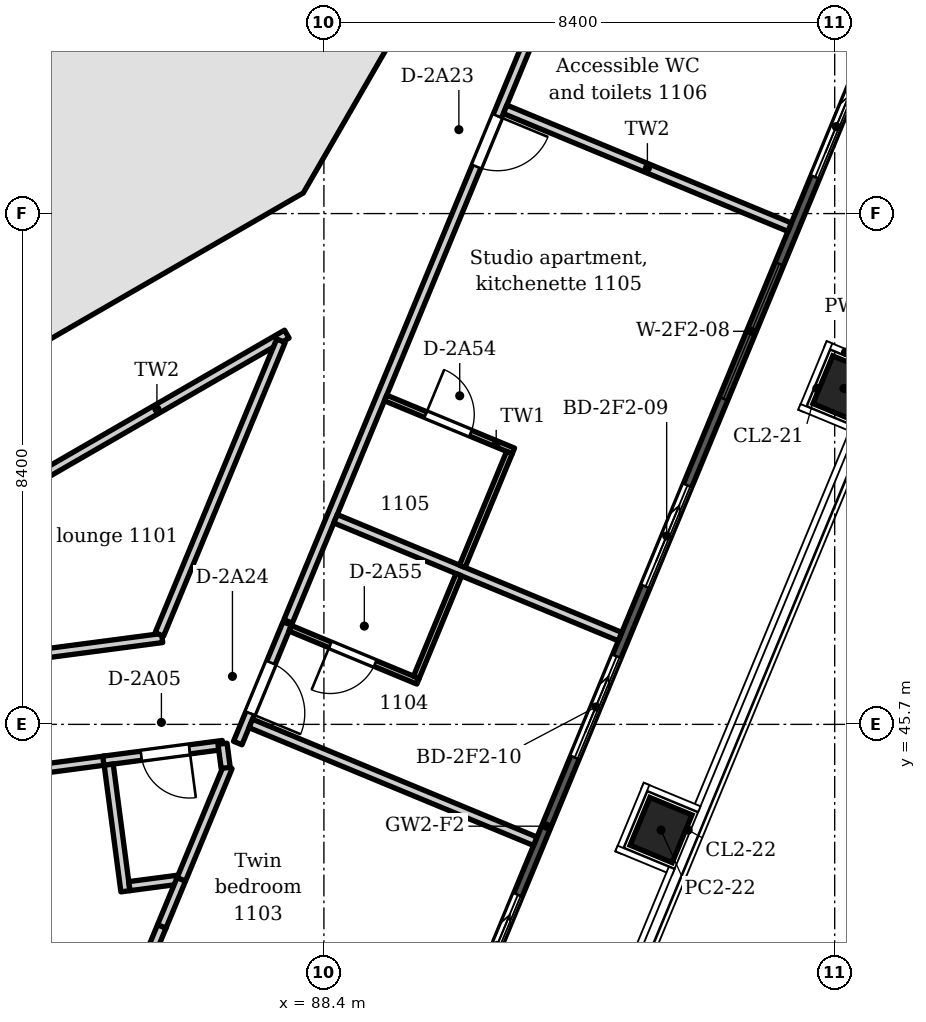
"""IFC4 building model, lengths in metres.
Left out: names, types, materials, properties, quantities, classifications, styles, units other than length and angle.
Written with IfcOpenShell. Run it as: python <this file> out.ifc"""

import sys

from ifc_helpers import new_model, si_unit, direction, frame, frame_2d, origin, origin_2d, place, context, subcontext, project, spatial, polyline, rectangle, outline, extrude, element, fill, save


model = new_model("IFC4")
c1 = context("Model", 3, precision=1e-05, world=origin(), true_north=direction((0.0, 1.0)))
c2 = subcontext(c1, "Body", "Model", "MODEL_VIEW")
j1 = project(units=[si_unit("LENGTHUNIT", "METRE"), si_unit("PLANEANGLEUNIT", "RADIAN")], contexts=[c1])
p1 = place(None, origin())
s1 = spatial("IfcSite", under=j1, at=p1, CompositionType="ELEMENT")
p2 = place(p1, origin())
s2 = spatial("IfcBuilding", under=s1, at=p2, CompositionType="ELEMENT")
p3 = place(p2, frame((0.0, 0.0, 50.4)))
s3 = spatial("IfcBuildingStorey", under=s2, at=p3, CompositionType="ELEMENT", Elevation=50.4)
p4 = place(p3, frame((82.65, 52.008, 0.0), z_axis=(0.0, 0.0, 1.0), x_axis=(0.866037463336, 0.499979111662, 0.0)))
e1 = element("IfcWall", 1, at=p4, inside=s3, PredefinedType="SHEAR", context=c2, shape_type="SweptSolid", body=[
    extrude(outline(polyline([(0.0, -0.6), (5.901, -0.6), (5.58, 0.6), (0.322, 0.6), (0.0, -0.6)])), origin(), (0.0, 0.0, 1.0), 3.6),
])
p5 = place(p4, frame((3.85, 0.0, 0.0)))
e2 = element("IfcOpeningElement", 2, at=p5, cuts=e1, PredefinedType="OPENING", context=c2, shape_type="SweptSolid", body=[
    extrude(rectangle(XDim=0.9, YDim=2.1, at=frame_2d((0.45, 1.05))), frame((0.0, 0.61, 0.0), z_axis=(0.0, -1.0, 0.0), x_axis=(1.0, 0.0, 0.0)), (0.0, 0.0, 1.0), 1.22),
])
p6 = place(p3, frame((87.542, 54.739, 0.0), z_axis=(0.0, 0.0, 1.0), x_axis=(0.499979111662, 0.866037463336, 0.0)))
e3 = element("IfcWall", 3, at=p6, inside=s3, PredefinedType="SHEAR", context=c2, shape_type="SweptSolid", body=[
    extrude(outline(polyline([(0.0, -0.6), (5.901, -0.6), (5.58, 0.6), (0.322, 0.6), (0.0, -0.6)])), origin(), (0.0, 0.0, 1.0), 3.6),
])
p7 = place(p6, frame((2.25, 0.0, 0.0)))
e4 = element("IfcOpeningElement", 4, at=p7, cuts=e3, PredefinedType="OPENING", context=c2, shape_type="SweptSolid", body=[
    extrude(rectangle(XDim=1.4, YDim=2.1, at=frame_2d((0.7, 1.05))), frame((0.0, 0.61, 0.0), z_axis=(0.0, -1.0, 0.0), x_axis=(1.0, 0.0, 0.0)), (0.0, 0.0, 1.0), 1.22),
])
p8 = place(p3, frame((80.225, 60.552, 0.0), z_axis=(0.0, 0.0, 1.0), x_axis=(0.865965399159, -0.500103916661, 0.0)))
e5 = element("IfcWall", 5, at=p8, inside=s3, PredefinedType="SHEAR", context=c2, shape_type="SweptSolid", body=[
    extrude(rectangle(XDim=8.642, YDim=0.3, at=frame_2d((4.321, 0.0))), origin(), (0.0, 0.0, 1.0), 3.6),
])
for number, where, z_axis, x_axis in (
    (6, (96.952, 51.224, -0.35), (0.0, 0.0, 1.0), (0.383, 0.924, 0.0)),
    (7, (93.944, 43.962, -0.35), (0.0, 0.0, 1.0), (0.383, 0.924, 0.0)),
):
    element("IfcColumn", number, at=place(p3, frame(where, z_axis=z_axis, x_axis=x_axis)), inside=s3, PredefinedType="COLUMN", context=c2, shape_type="SweptSolid", body=[
        extrude(rectangle(XDim=0.85, YDim=0.75, at=origin_2d()), origin(), (0.0, 0.0, 1.0), 3.95),
    ])
p9 = place(p3, frame((105.889, 77.411, 0.0), z_axis=(0.0, 0.0, 1.0), x_axis=(-0.38268395344, -0.923879316675, 0.0)))
e8 = element("IfcWall", 8, at=p9, inside=s3, PredefinedType="SOLIDWALL", context=c2, shape_type="SweptSolid", body=[
    extrude(outline(polyline([(0.149, 0.075), (0.149, -0.075), (47.217, -0.075), (47.217, 0.075), (0.149, 0.075)])), origin(), (0.0, 0.0, 1.0), 3.3),
])
p10 = place(p9, frame((1.222, 0.0, 0.0)))
e9 = element("IfcOpeningElement", 9, at=p10, cuts=e8, PredefinedType="OPENING", context=c2, shape_type="SweptSolid", body=[
    extrude(rectangle(XDim=1.8, YDim=2.6, at=frame_2d((0.9, 1.3))), frame((0.0, 0.085, 0.0), z_axis=(0.0, -1.0, 0.0), x_axis=(1.0, 0.0, 0.0)), (0.0, 0.0, 1.0), 0.17),
])
p11 = place(p9, frame((4.565, 0.0, 0.0)))
e10 = element("IfcOpeningElement", 10, at=p11, cuts=e8, PredefinedType="OPENING", context=c2, shape_type="SweptSolid", body=[
    extrude(rectangle(XDim=1.8, YDim=2.6, at=frame_2d((0.9, 1.3))), frame((0.0, 0.085, 0.0), z_axis=(0.0, -1.0, 0.0), x_axis=(1.0, 0.0, 0.0)), (0.0, 0.0, 1.0), 0.17),
])
p12 = place(p9, frame((8.209, 0.0, 0.0)))
e11 = element("IfcOpeningElement", 11, at=p12, cuts=e8, PredefinedType="OPENING", context=c2, shape_type="SweptSolid", body=[
    extrude(rectangle(XDim=1.8, YDim=2.6, at=frame_2d((0.9, 1.3))), frame((0.0, 0.085, 0.0), z_axis=(0.0, -1.0, 0.0), x_axis=(1.0, 0.0, 0.0)), (0.0, 0.0, 1.0), 0.17),
])
p13 = place(p9, frame((12.453, 0.0, 0.0)))
e12 = element("IfcOpeningElement", 12, at=p13, cuts=e8, PredefinedType="OPENING", context=c2, shape_type="SweptSolid", body=[
    extrude(rectangle(XDim=1.8, YDim=2.6, at=frame_2d((0.9, 1.3))), frame((0.0, 0.085, 0.0), z_axis=(0.0, -1.0, 0.0), x_axis=(1.0, 0.0, 0.0)), (0.0, 0.0, 1.0), 0.17),
])
p14 = place(p9, frame((15.496, 0.0, 0.0)))
e13 = element("IfcOpeningElement", 13, at=p14, cuts=e8, PredefinedType="OPENING", context=c2, shape_type="SweptSolid", body=[
    extrude(rectangle(XDim=1.8, YDim=2.6, at=frame_2d((0.9, 1.3))), frame((0.0, 0.085, 0.0), z_axis=(0.0, -1.0, 0.0), x_axis=(1.0, 0.0, 0.0)), (0.0, 0.0, 1.0), 0.17),
])
p15 = place(p9, frame((18.84, 0.0, 0.15)))
e14 = element("IfcOpeningElement", 14, at=p15, cuts=e8, PredefinedType="OPENING", context=c2, shape_type="SweptSolid", body=[
    extrude(rectangle(XDim=2.4, YDim=2.45, at=frame_2d((1.2, 1.225))), frame((0.0, 0.085, 0.0), z_axis=(0.0, -1.0, 0.0), x_axis=(1.0, 0.0, 0.0)), (0.0, 0.0, 1.0), 0.17),
])
p16 = place(p9, frame((22.783, 0.0, 0.0)))
e15 = element("IfcOpeningElement", 15, at=p16, cuts=e8, PredefinedType="OPENING", context=c2, shape_type="SweptSolid", body=[
    extrude(rectangle(XDim=1.8, YDim=2.6, at=frame_2d((0.9, 1.3))), frame((0.0, 0.085, 0.0), z_axis=(0.0, -1.0, 0.0), x_axis=(1.0, 0.0, 0.0)), (0.0, 0.0, 1.0), 0.17),
])
p17 = place(p9, frame((26.127, 0.0, 0.15)))
e16 = element("IfcOpeningElement", 16, at=p17, cuts=e8, PredefinedType="OPENING", context=c2, shape_type="SweptSolid", body=[
    extrude(rectangle(XDim=2.4, YDim=2.45, at=frame_2d((1.2, 1.225))), frame((0.0, 0.085, 0.0), z_axis=(0.0, -1.0, 0.0), x_axis=(1.0, 0.0, 0.0)), (0.0, 0.0, 1.0), 0.17),
])
p18 = place(p9, frame((30.071, 0.0, 0.0)))
e17 = element("IfcOpeningElement", 17, at=p18, cuts=e8, PredefinedType="OPENING", context=c2, shape_type="SweptSolid", body=[
    extrude(rectangle(XDim=1.8, YDim=2.6, at=frame_2d((0.9, 1.3))), frame((0.0, 0.085, 0.0), z_axis=(0.0, -1.0, 0.0), x_axis=(1.0, 0.0, 0.0)), (0.0, 0.0, 1.0), 0.17),
])
p19 = place(p9, frame((33.114, 0.0, 0.0)))
e18 = element("IfcOpeningElement", 18, at=p19, cuts=e8, PredefinedType="OPENING", context=c2, shape_type="SweptSolid", body=[
    extrude(rectangle(XDim=1.8, YDim=2.6, at=frame_2d((0.9, 1.3))), frame((0.0, 0.085, 0.0), z_axis=(0.0, -1.0, 0.0), x_axis=(1.0, 0.0, 0.0)), (0.0, 0.0, 1.0), 0.17),
])
p20 = place(p9, frame((37.358, 0.0, 0.0)))
e19 = element("IfcOpeningElement", 19, at=p20, cuts=e8, PredefinedType="OPENING", context=c2, shape_type="SweptSolid", body=[
    extrude(rectangle(XDim=1.8, YDim=2.6, at=frame_2d((0.9, 1.3))), frame((0.0, 0.085, 0.0), z_axis=(0.0, -1.0, 0.0), x_axis=(1.0, 0.0, 0.0)), (0.0, 0.0, 1.0), 0.17),
])
p21 = place(p9, frame((41.001, 0.0, 0.0)))
e20 = element("IfcOpeningElement", 20, at=p21, cuts=e8, PredefinedType="OPENING", context=c2, shape_type="SweptSolid", body=[
    extrude(rectangle(XDim=1.8, YDim=2.6, at=frame_2d((0.9, 1.3))), frame((0.0, 0.085, 0.0), z_axis=(0.0, -1.0, 0.0), x_axis=(1.0, 0.0, 0.0)), (0.0, 0.0, 1.0), 0.17),
])
p22 = place(p9, frame((44.345, 0.0, 0.0)))
e21 = element("IfcOpeningElement", 21, at=p22, cuts=e8, PredefinedType="OPENING", context=c2, shape_type="SweptSolid", body=[
    extrude(rectangle(XDim=1.8, YDim=2.6, at=frame_2d((0.9, 1.3))), frame((0.0, 0.085, 0.0), z_axis=(0.0, -1.0, 0.0), x_axis=(1.0, 0.0, 0.0)), (0.0, 0.0, 1.0), 0.17),
])
p23 = place(p3, frame((78.586, 46.178, 0.0), z_axis=(0.0, 0.0, 1.0), x_axis=(0.991437356371, 0.130583185714, 0.0)))
e22 = element("IfcWall", 22, at=p23, inside=s3, PredefinedType="PARTITIONING", context=c2, shape_type="SweptSolid", body=[
    extrude(rectangle(XDim=7.215, YDim=0.15, at=frame_2d((3.607, 0.0))), origin(), (0.0, 0.0, 1.0), 2.75),
])
p24 = place(p23, frame((3.12, 0.0, 0.0)))
e23 = element("IfcOpeningElement", 23, at=p24, cuts=e22, PredefinedType="OPENING", context=c2, shape_type="SweptSolid", body=[
    extrude(rectangle(XDim=0.9, YDim=2.1, at=frame_2d((0.45, 1.05))), frame((0.0, 0.085, 0.0), z_axis=(0.0, -1.0, 0.0), x_axis=(1.0, 0.0, 0.0)), (0.0, 0.0, 1.0), 0.17),
])
p25 = place(p3, frame((82.333, 44.78, 0.0), z_axis=(0.0, 0.0, 1.0), x_axis=(0.991416071527, 0.130744686764, 0.0)))
e24 = element("IfcWall", 24, at=p25, inside=s3, PredefinedType="PARTITIONING", context=c2, shape_type="SweptSolid", body=[
    extrude(rectangle(XDim=2.525, YDim=0.15, at=frame_2d((1.262, 0.0))), origin(), (0.0, 0.0, 1.0), 2.75),
])
p26 = place(p3, frame((83.518, 49.65, 0.0), z_axis=(0.0, 0.0, 1.0), x_axis=(0.865971288988, 0.500093717866, 0.0)))
e25 = element("IfcWall", 25, at=p26, inside=s3, PredefinedType="PARTITIONING", context=c2, shape_type="SweptSolid", body=[
    extrude(rectangle(XDim=4.933, YDim=0.15, at=frame_2d((2.467, 0.0))), origin(), (0.0, 0.0, 1.0), 3.3),
])
p27 = place(p3, frame((84.773, 45.102, 0.0), z_axis=(0.0, 0.0, 1.0), x_axis=(0.991450105095, 0.130486356022, 0.0)))
e26 = element("IfcWall", 26, at=p27, inside=s3, PredefinedType="PARTITIONING", context=c2, shape_type="SweptSolid", body=[
    extrude(rectangle(XDim=1.983, YDim=0.15, at=frame_2d((0.992, 0.0))), origin(), (0.0, 0.0, 1.0), 3.3),
])
p28 = place(p27, frame((0.629, 0.0, 0.0)))
e27 = element("IfcOpeningElement", 27, at=p28, cuts=e26, PredefinedType="OPENING", context=c2, shape_type="SweptSolid", body=[
    extrude(rectangle(XDim=0.8, YDim=2.1, at=frame_2d((0.4, 1.05))), frame((0.0, 0.085, 0.0), z_axis=(0.0, -1.0, 0.0), x_axis=(1.0, 0.0, 0.0)), (0.0, 0.0, 1.0), 0.17),
])
p29 = place(p3, frame((84.861, 45.038, 0.0), z_axis=(0.0, 0.0, 1.0), x_axis=(0.130899564309, -0.991395634479, 0.0)))
e28 = element("IfcWall", 28, at=p29, inside=s3, PredefinedType="PARTITIONING", context=c2, shape_type="SweptSolid", body=[
    extrude(rectangle(XDim=2.1, YDim=0.15, at=frame_2d((1.05, 0.0))), origin(), (0.0, 0.0, 1.0), 3.3),
])
p30 = place(p3, frame((85.2, 43.04, 0.0), z_axis=(0.0, 0.0, 1.0), x_axis=(0.991515431038, 0.129989038049, 0.0)))
e29 = element("IfcWall", 29, at=p30, inside=s3, PredefinedType="PARTITIONING", context=c2, shape_type="SweptSolid", body=[
    extrude(rectangle(XDim=0.787, YDim=0.15, at=frame_2d((0.394, 0.0))), origin(), (0.0, 0.0, 1.0), 3.3),
])
p31 = place(p3, frame((85.161, 40.994, 0.0), z_axis=(0.0, 0.0, 1.0), x_axis=(0.382519732759, 0.923947322118, 0.0)))
e30 = element("IfcWall", 30, at=p31, inside=s3, PredefinedType="PARTITIONING", context=c2, shape_type="SweptSolid", body=[
    extrude(rectangle(XDim=1.498, YDim=0.15, at=frame_2d((0.749, 0.0))), origin(), (0.0, 0.0, 1.0), 3.3),
])
p32 = place(p3, frame((85.694, 47.179, 0.0), z_axis=(0.0, 0.0, 1.0), x_axis=(0.382564920946, 0.923928612643, 0.0)))
e31 = element("IfcWall", 31, at=p32, inside=s3, PredefinedType="PARTITIONING", context=c2, shape_type="SweptSolid", body=[
    extrude(rectangle(XDim=5.227, YDim=0.15, at=frame_2d((2.614, 0.0))), origin(), (0.0, 0.0, 1.0), 3.3),
])
p33 = place(p3, frame((85.734, 42.378, 0.0), z_axis=(0.0, 0.0, 1.0), x_axis=(0.383063523393, 0.923722002036, 0.0)))
e32 = element("IfcWall", 32, at=p33, inside=s3, PredefinedType="PARTITIONING", context=c2, shape_type="SweptSolid", body=[
    extrude(rectangle(XDim=0.838, YDim=0.15, at=frame_2d((0.419, 0.0))), origin(), (0.0, 0.0, 1.0), 3.3),
])
p34 = place(p3, frame((86.055, 43.152, 0.0), z_axis=(0.0, 0.0, 1.0), x_axis=(0.382829605696, 0.923818971987, 0.0)))
e33 = element("IfcWall", 33, at=p34, inside=s3, PredefinedType="PARTITIONING", context=c2, shape_type="SweptSolid", body=[
    extrude(rectangle(XDim=2.0, YDim=0.15, at=frame_2d((1.0, 0.0))), origin(), (0.0, 0.0, 1.0), 3.3),
])
p35 = place(p3, frame((86.732, 45.381, 0.0), z_axis=(0.0, 0.0, 1.0), x_axis=(0.131843859112, -0.99127049629, 0.0)))
e34 = element("IfcWall", 34, at=p35, inside=s3, PredefinedType="PARTITIONING", context=c2, shape_type="SweptSolid", body=[
    extrude(rectangle(XDim=0.4, YDim=0.15, at=frame_2d((0.2, 0.0))), origin(), (0.0, 0.0, 1.0), 3.3),
])
p36 = place(p3, frame((86.983, 45.393, 0.0), z_axis=(0.0, 0.0, 1.0), x_axis=(0.382618621816, 0.923906375257, 0.0)))
e35 = element("IfcWall", 35, at=p36, inside=s3, PredefinedType="PARTITIONING", context=c2, shape_type="SweptSolid", body=[
    extrude(rectangle(XDim=2.128, YDim=0.15, at=frame_2d((1.064, 0.0))), origin(), (0.0, 0.0, 1.0), 3.3),
])
p37 = place(p36, frame((0.53, 0.0, 0.0)))
e36 = element("IfcOpeningElement", 36, at=p37, cuts=e35, PredefinedType="OPENING", context=c2, shape_type="SweptSolid", body=[
    extrude(rectangle(XDim=0.9, YDim=2.1, at=frame_2d((0.45, 1.05))), frame((0.0, 0.085, 0.0), z_axis=(0.0, -1.0, 0.0), x_axis=(1.0, 0.0, 0.0)), (0.0, 0.0, 1.0), 0.17),
])
p38 = place(p3, frame((87.197, 45.715, 0.0), z_axis=(0.0, 0.0, 1.0), x_axis=(0.923879340067, -0.382683896966, 0.0)))
e37 = element("IfcWall", 37, at=p38, inside=s3, PredefinedType="PARTITIONING", context=c2, shape_type="SweptSolid", body=[
    extrude(rectangle(XDim=5.064, YDim=0.15, at=frame_2d((2.532, 0.0))), origin(), (0.0, 0.0, 1.0), 3.3),
])
p39 = place(p3, frame((87.845, 47.28, 0.0), z_axis=(0.0, 0.0, 1.0), x_axis=(0.92378006954, -0.382923469012, 0.0)))
e38 = element("IfcWall", 38, at=p39, inside=s3, PredefinedType="PARTITIONING", context=c2, shape_type="SweptSolid", body=[
    extrude(rectangle(XDim=2.275, YDim=0.1, at=frame_2d((1.138, 0.0))), origin(), (0.0, 0.0, 1.0), 3.3),
])
p40 = place(p39, frame((0.713, 0.0, 0.0)))
e39 = element("IfcOpeningElement", 39, at=p40, cuts=e38, PredefinedType="OPENING", context=c2, shape_type="SweptSolid", body=[
    extrude(rectangle(XDim=0.8, YDim=2.1, at=frame_2d((0.4, 1.05))), frame((0.0, 0.06, 0.0), z_axis=(0.0, -1.0, 0.0), x_axis=(1.0, 0.0, 0.0)), (0.0, 0.0, 1.0), 0.12),
])
p41 = place(p3, frame((87.811, 47.393, 0.0), z_axis=(0.0, 0.0, 1.0), x_axis=(0.382671722525, 0.923884382799, 0.0)))
e40 = element("IfcWall", 40, at=p41, inside=s3, PredefinedType="PARTITIONING", context=c2, shape_type="SweptSolid", body=[
    extrude(rectangle(XDim=10.761, YDim=0.15, at=frame_2d((5.38, 0.0))), origin(), (0.0, 0.0, 1.0), 3.3),
])
p42 = place(p41, frame((8.096, 0.0, 0.0)))
e41 = element("IfcOpeningElement", 41, at=p42, cuts=e40, PredefinedType="OPENING", context=c2, shape_type="SweptSolid", body=[
    extrude(rectangle(XDim=0.9, YDim=2.1, at=frame_2d((0.45, 1.05))), frame((0.0, 0.085, 0.0), z_axis=(0.0, -1.0, 0.0), x_axis=(1.0, 0.0, 0.0)), (0.0, 0.0, 1.0), 0.17),
])
p43 = place(p3, frame((88.591, 49.081, 0.0), z_axis=(0.0, 0.0, 1.0), x_axis=(0.923879340067, -0.382683896966, 0.0)))
e42 = element("IfcWall", 42, at=p43, inside=s3, PredefinedType="PARTITIONING", context=c2, shape_type="SweptSolid", body=[
    extrude(rectangle(XDim=5.064, YDim=0.15, at=frame_2d((2.532, 0.0))), origin(), (0.0, 0.0, 1.0), 3.3),
])
p44 = place(p3, frame((89.414, 51.067, 0.0), z_axis=(0.0, 0.0, 1.0), x_axis=(0.923916126796, -0.382595073996, 0.0)))
e43 = element("IfcWall", 43, at=p44, inside=s3, PredefinedType="PARTITIONING", context=c2, shape_type="SweptSolid", body=[
    extrude(rectangle(XDim=2.275, YDim=0.1, at=frame_2d((1.137, 0.0))), origin(), (0.0, 0.0, 1.0), 3.3),
])
p45 = place(p44, frame((0.712, 0.0, 0.0)))
e44 = element("IfcOpeningElement", 44, at=p45, cuts=e43, PredefinedType="OPENING", context=c2, shape_type="SweptSolid", body=[
    extrude(rectangle(XDim=0.8, YDim=2.1, at=frame_2d((0.4, 1.05))), frame((0.0, 0.06, 0.0), z_axis=(0.0, -1.0, 0.0), x_axis=(1.0, 0.0, 0.0)), (0.0, 0.0, 1.0), 0.12),
])
p46 = place(p3, frame((89.92, 46.474, 0.0), z_axis=(0.0, 0.0, 1.0), x_axis=(0.382525049986, 0.923945120737, 0.0)))
e45 = element("IfcWall", 45, at=p46, inside=s3, PredefinedType="PARTITIONING", context=c2, shape_type="SweptSolid", body=[
    extrude(rectangle(XDim=1.825, YDim=0.1, at=frame_2d((0.913, 0.0))), origin(), (0.0, 0.0, 1.0), 3.3),
])
p47 = place(p3, frame((90.676, 48.299, 0.0), z_axis=(0.0, 0.0, 1.0), x_axis=(0.382816773578, 0.923824289498, 0.0)))
e46 = element("IfcWall", 46, at=p47, inside=s3, PredefinedType="PARTITIONING", context=c2, shape_type="SweptSolid", body=[
    extrude(rectangle(XDim=2.025, YDim=0.1, at=frame_2d((1.012, 0.0))), origin(), (0.0, 0.0, 1.0), 3.3),
])
p48 = place(p3, frame((91.38, 55.814, 0.0), z_axis=(0.0, 0.0, 1.0), x_axis=(0.923879340067, -0.382683896966, 0.0)))
e47 = element("IfcWall", 47, at=p48, inside=s3, PredefinedType="PARTITIONING", context=c2, shape_type="SweptSolid", body=[
    extrude(rectangle(XDim=5.064, YDim=0.15, at=frame_2d((2.532, 0.0))), origin(), (0.0, 0.0, 1.0), 3.3),
])
p49 = place(p3, frame((84.905, 54.003, 0.0), z_axis=(0.0, 0.0, 1.0), x_axis=(-0.5000780968, 0.865980309881, 0.0)))
e48 = element("IfcWall", 48, at=p49, inside=s3, PredefinedType="PARTITIONING", context=c2, shape_type="SweptSolid", body=[
    extrude(rectangle(XDim=2.08, YDim=0.15, at=frame_2d((1.04, 0.0))), origin(), (0.0, 0.0, 1.0), 3.3),
])
p50 = place(p16, origin())
e49 = element("IfcDoor", 49, at=p50, inside=s3, OperationType="SLIDING_TO_LEFT", PredefinedType="DOOR", context=c2, shape_type="SweptSolid", body=[
    extrude(rectangle(XDim=1.8, YDim=2.6, at=frame_2d((0.9, 1.3))), frame((0.0, 0.025, 0.0), z_axis=(0.0, -1.0, 0.0), x_axis=(1.0, 0.0, 0.0)), (0.0, 0.0, 1.0), 0.05),
])
fill(e15, e49)
p51 = place(p17, origin())
e50 = element("IfcWindow", 50, at=p51, inside=s3, PartitioningType="SINGLE_PANEL", PredefinedType="WINDOW", context=c2, shape_type="SweptSolid", body=[
    extrude(rectangle(XDim=2.4, YDim=2.45, at=frame_2d((1.2, 1.225))), frame((0.0, 0.03, 0.0), z_axis=(0.0, -1.0, 0.0), x_axis=(1.0, 0.0, 0.0)), (0.0, 0.0, 1.0), 0.06),
])
fill(e16, e50)
p52 = place(p18, origin())
e51 = element("IfcDoor", 51, at=p52, inside=s3, OperationType="SLIDING_TO_LEFT", PredefinedType="DOOR", context=c2, shape_type="SweptSolid", body=[
    extrude(rectangle(XDim=1.8, YDim=2.6, at=frame_2d((0.9, 1.3))), frame((0.0, 0.025, 0.0), z_axis=(0.0, -1.0, 0.0), x_axis=(1.0, 0.0, 0.0)), (0.0, 0.0, 1.0), 0.05),
])
fill(e17, e51)
p53 = place(p19, origin())
e52 = element("IfcDoor", 52, at=p53, inside=s3, OperationType="SLIDING_TO_LEFT", PredefinedType="DOOR", context=c2, shape_type="SweptSolid", body=[
    extrude(rectangle(XDim=1.8, YDim=2.6, at=frame_2d((0.9, 1.3))), frame((0.0, 0.025, 0.0), z_axis=(0.0, -1.0, 0.0), x_axis=(1.0, 0.0, 0.0)), (0.0, 0.0, 1.0), 0.05),
])
fill(e18, e52)
p54 = place(p20, origin())
e53 = element("IfcDoor", 53, at=p54, inside=s3, OperationType="SLIDING_TO_LEFT", PredefinedType="DOOR", context=c2, shape_type="SweptSolid", body=[
    extrude(rectangle(XDim=1.8, YDim=2.6, at=frame_2d((0.9, 1.3))), frame((0.0, 0.025, 0.0), z_axis=(0.0, -1.0, 0.0), x_axis=(1.0, 0.0, 0.0)), (0.0, 0.0, 1.0), 0.05),
])
fill(e19, e53)
p55 = place(p28, frame((0.8, 0.0, 0.0), z_axis=(0.0, 0.0, 1.0), x_axis=(-1.0, 0.0, 0.0)))
e54 = element("IfcDoor", 54, at=p55, inside=s3, OperationType="SINGLE_SWING_LEFT", PredefinedType="DOOR", context=c2, shape_type="SweptSolid", body=[
    extrude(rectangle(XDim=0.8, YDim=2.1, at=frame_2d((0.4, 1.05))), frame((0.0, 0.025, 0.0), z_axis=(0.0, -1.0, 0.0), x_axis=(1.0, 0.0, 0.0)), (0.0, 0.0, 1.0), 0.05),
])
fill(e27, e54)
p56 = place(p42, frame((0.9, 0.0, 0.0), z_axis=(0.0, 0.0, 1.0), x_axis=(-1.0, 0.0, 0.0)))
e55 = element("IfcDoor", 55, at=p56, inside=s3, OperationType="SINGLE_SWING_LEFT", PredefinedType="DOOR", context=c2, shape_type="SweptSolid", body=[
    extrude(rectangle(XDim=0.9, YDim=2.1, at=frame_2d((0.45, 1.05))), frame((0.0, 0.025, 0.0), z_axis=(0.0, -1.0, 0.0), x_axis=(1.0, 0.0, 0.0)), (0.0, 0.0, 1.0), 0.05),
])
fill(e41, e55)
p57 = place(p37, frame((0.9, 0.0, 0.0), z_axis=(0.0, 0.0, 1.0), x_axis=(-1.0, 0.0, 0.0)))
e56 = element("IfcDoor", 56, at=p57, inside=s3, OperationType="SINGLE_SWING_RIGHT", PredefinedType="DOOR", context=c2, shape_type="SweptSolid", body=[
    extrude(rectangle(XDim=0.9, YDim=2.1, at=frame_2d((0.45, 1.05))), frame((0.0, 0.025, 0.0), z_axis=(0.0, -1.0, 0.0), x_axis=(1.0, 0.0, 0.0)), (0.0, 0.0, 1.0), 0.05),
])
fill(e36, e56)
p58 = place(p45, origin())
e57 = element("IfcDoor", 57, at=p58, inside=s3, OperationType="SINGLE_SWING_LEFT", PredefinedType="DOOR", context=c2, shape_type="SweptSolid", body=[
    extrude(rectangle(XDim=0.8, YDim=2.1, at=frame_2d((0.4, 1.05))), frame((0.0, 0.025, 0.0), z_axis=(0.0, -1.0, 0.0), x_axis=(1.0, 0.0, 0.0)), (0.0, 0.0, 1.0), 0.05),
])
fill(e44, e57)
p59 = place(p40, frame((0.8, 0.0, 0.0), z_axis=(0.0, 0.0, 1.0), x_axis=(-1.0, 0.0, 0.0)))
e58 = element("IfcDoor", 58, at=p59, inside=s3, OperationType="SINGLE_SWING_RIGHT", PredefinedType="DOOR", context=c2, shape_type="SweptSolid", body=[
    extrude(rectangle(XDim=0.8, YDim=2.1, at=frame_2d((0.4, 1.05))), frame((0.0, 0.025, 0.0), z_axis=(0.0, -1.0, 0.0), x_axis=(1.0, 0.0, 0.0)), (0.0, 0.0, 1.0), 0.05),
])
fill(e39, e58)
p60 = place(p7, origin())
e59 = element("IfcDoor", 59, at=p60, inside=s3, OperationType="DOUBLE_DOOR_SINGLE_SWING", PredefinedType="DOOR", context=c2, shape_type="SweptSolid", body=[
    extrude(rectangle(XDim=1.4, YDim=2.1, at=frame_2d((0.7, 1.05))), frame((0.0, 0.025, 0.0), z_axis=(0.0, -1.0, 0.0), x_axis=(1.0, 0.0, 0.0)), (0.0, 0.0, 1.0), 0.05),
])
fill(e4, e59)
p61 = place(p5, origin())
e60 = element("IfcDoor", 60, at=p61, inside=s3, OperationType="SINGLE_SWING_RIGHT", PredefinedType="DOOR", context=c2, shape_type="SweptSolid", body=[
    extrude(rectangle(XDim=0.9, YDim=2.1, at=frame_2d((0.45, 1.05))), frame((0.0, 0.325, 0.0), z_axis=(0.0, -1.0, 0.0), x_axis=(1.0, 0.0, 0.0)), (0.0, 0.0, 1.0), 0.05),
])
fill(e2, e60)
save(model, sys.argv[1])
